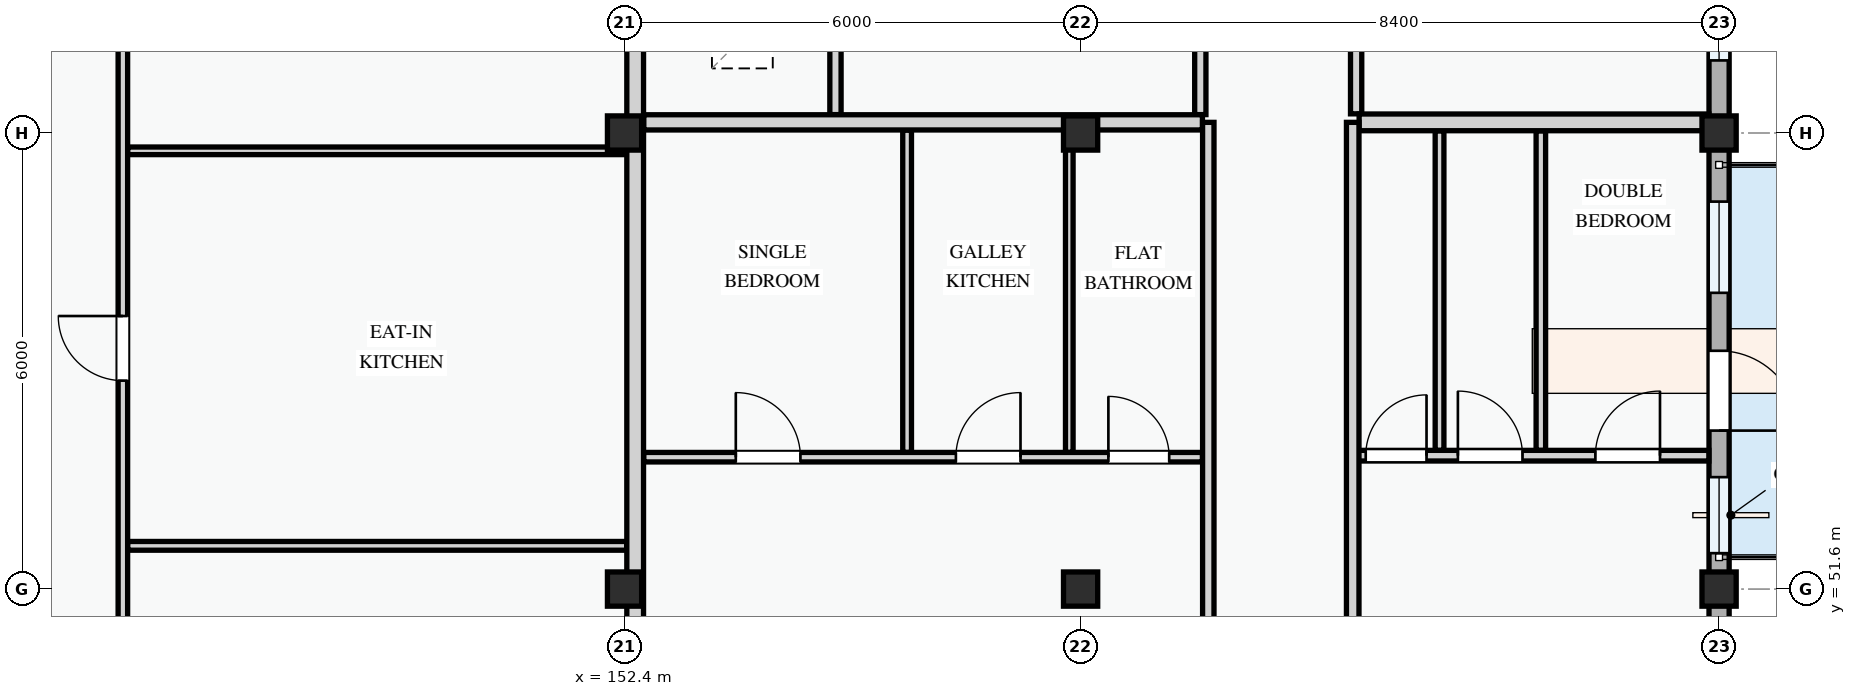
"""IFC4 building model, lengths in metres.
Left out: names, types, materials, properties, quantities, classifications, styles, units other than length and angle.
Written with IfcOpenShell. Run it as: python <this file> out.ifc"""

import sys

from ifc_helpers import new_model, si_unit, direction, frame, frame_2d, origin, origin_2d, place, context, subcontext, project, spatial, rectangle, extrude, element, fill, save


model = new_model("IFC4")
c1 = context("Model", 3, precision=1e-05, world=origin(), true_north=direction((0.0, 1.0)))
c2 = subcontext(c1, "Body", "Model", "MODEL_VIEW")
j1 = project(units=[si_unit("LENGTHUNIT", "METRE"), si_unit("PLANEANGLEUNIT", "RADIAN")], contexts=[c1])
p1 = place(None, origin())
s1 = spatial("IfcSite", under=j1, at=p1, CompositionType="ELEMENT")
p2 = place(p1, origin())
s2 = spatial("IfcBuilding", under=s1, at=p2, CompositionType="ELEMENT")
p3 = place(p2, frame((0.0, 0.0, 24.6)))
s3 = spatial("IfcBuildingStorey", under=s2, at=p3, CompositionType="ELEMENT", Elevation=24.6)
for number, where, z_axis, x_axis in (
    (1, (152.4, 51.6, 0.0), (0.0, 0.0, 1.0), (1.0, 0.0, 0.0)),
    (2, (152.4, 57.6, 0.0), (0.0, 0.0, 1.0), (1.0, 0.0, 0.0)),
    (3, (158.4, 51.6, 0.0), (0.0, 0.0, 1.0), (1.0, 0.0, 0.0)),
    (4, (158.4, 57.6, 0.0), (0.0, 0.0, 1.0), (1.0, 0.0, 0.0)),
    (5, (166.8, 51.6, 0.0), (0.0, 0.0, 1.0), (1.0, 0.0, 0.0)),
    (6, (166.8, 57.6, 0.0), (0.0, 0.0, 1.0), (1.0, 0.0, 0.0)),
):
    element("IfcColumn", number, at=place(p3, frame(where, z_axis=z_axis, x_axis=x_axis)), inside=s3, PredefinedType="COLUMN", context=c2, shape_type="SweptSolid", body=[
        extrude(rectangle(XDim=0.45, YDim=0.45, at=origin_2d()), origin(), (0.0, 0.0, 1.0), 3.3),
    ])
p4 = place(p3, frame((166.8, 43.2, 0.0), z_axis=(0.0, 0.0, 1.0), x_axis=(0.0, 1.0, 0.0)))
e7 = element("IfcWall", 7, at=p4, inside=s3, PredefinedType="STANDARD", context=c2, shape_type="SweptSolid", body=[
    extrude(rectangle(XDim=8.4, YDim=0.265, at=frame_2d((4.2, 0.0))), origin(), (0.0, 0.0, 1.0), 2.425),
])
p5 = place(p4, frame((0.62, 0.0, 0.0)))
e8 = element("IfcOpeningElement", 8, at=p5, cuts=e7, PredefinedType="OPENING", context=c2, shape_type="SweptSolid", body=[
    extrude(rectangle(XDim=1.6, YDim=2.2, at=frame_2d((0.8, 1.1))), frame((0.0, 0.143, 0.0), z_axis=(0.0, -1.0, 0.0), x_axis=(1.0, 0.0, 0.0)), (0.0, 0.0, 1.0), 0.285),
])
p6 = place(p4, frame((3.35, 0.0, 0.78)))
e9 = element("IfcOpeningElement", 9, at=p6, cuts=e7, PredefinedType="OPENING", context=c2, shape_type="SweptSolid", body=[
    extrude(rectangle(XDim=1.1, YDim=1.3, at=frame_2d((0.55, 0.65))), frame((0.0, 0.143, 0.0), z_axis=(0.0, -1.0, 0.0), x_axis=(1.0, 0.0, 0.0)), (0.0, 0.0, 1.0), 0.285),
])
p7 = place(p4, frame((5.97, 0.0, 0.78)))
e10 = element("IfcOpeningElement", 10, at=p7, cuts=e7, PredefinedType="OPENING", context=c2, shape_type="SweptSolid", body=[
    extrude(rectangle(XDim=1.8, YDim=1.5, at=frame_2d((0.9, 0.75))), frame((0.0, 0.143, 0.0), z_axis=(0.0, -1.0, 0.0), x_axis=(1.0, 0.0, 0.0)), (0.0, 0.0, 1.0), 0.285),
])
p8 = place(p3, frame((166.8, 51.6, 0.0), z_axis=(0.0, 0.0, 1.0), x_axis=(0.0, 1.0, 0.0)))
e11 = element("IfcWall", 11, at=p8, inside=s3, PredefinedType="STANDARD", context=c2, shape_type="SweptSolid", body=[
    extrude(rectangle(XDim=6.0, YDim=0.265, at=frame_2d((3.0, 0.0))), origin(), (0.0, 0.0, 1.0), 2.575),
])
p9 = place(p8, frame((2.085, 0.0, 0.0)))
e12 = element("IfcOpeningElement", 12, at=p9, cuts=e11, PredefinedType="OPENING", context=c2, shape_type="SweptSolid", body=[
    extrude(rectangle(XDim=1.05, YDim=2.15, at=frame_2d((0.525, 1.075))), frame((0.0, 0.143, 0.0), z_axis=(0.0, -1.0, 0.0), x_axis=(1.0, 0.0, 0.0)), (0.0, 0.0, 1.0), 0.285),
])
p10 = place(p8, frame((0.472, 0.0, 0.78)))
e13 = element("IfcOpeningElement", 13, at=p10, cuts=e11, PredefinedType="OPENING", context=c2, shape_type="SweptSolid", body=[
    extrude(rectangle(XDim=1.0, YDim=1.25, at=frame_2d((0.5, 0.625))), frame((0.0, 0.143, 0.0), z_axis=(0.0, -1.0, 0.0), x_axis=(1.0, 0.0, 0.0)), (0.0, 0.0, 1.0), 0.285),
])
p11 = place(p8, frame((3.897, 0.0, 0.78)))
e14 = element("IfcOpeningElement", 14, at=p11, cuts=e11, PredefinedType="OPENING", context=c2, shape_type="SweptSolid", body=[
    extrude(rectangle(XDim=1.2, YDim=1.35, at=frame_2d((0.6, 0.675))), frame((0.0, 0.143, 0.0), z_axis=(0.0, -1.0, 0.0), x_axis=(1.0, 0.0, 0.0)), (0.0, 0.0, 1.0), 0.285),
])
p12 = place(p3, frame((166.8, 57.6, 0.0), z_axis=(0.0, 0.0, 1.0), x_axis=(0.0, 1.0, 0.0)))
e15 = element("IfcWall", 15, at=p12, inside=s3, PredefinedType="STANDARD", context=c2, shape_type="SweptSolid", body=[
    extrude(rectangle(XDim=8.4, YDim=0.265, at=frame_2d((4.2, 0.0))), origin(), (0.0, 0.0, 1.0), 2.425),
])
p13 = place(p12, frame((0.955, 0.0, 0.78)))
e16 = element("IfcOpeningElement", 16, at=p13, cuts=e15, PredefinedType="OPENING", context=c2, shape_type="SweptSolid", body=[
    extrude(rectangle(XDim=2.48, YDim=1.46, at=frame_2d((1.24, 0.73))), frame((0.0, 0.143, 0.0), z_axis=(0.0, -1.0, 0.0), x_axis=(1.0, 0.0, 0.0)), (0.0, 0.0, 1.0), 0.285),
])
p14 = place(p12, frame((4.923, 0.0, 0.78)))
e17 = element("IfcOpeningElement", 17, at=p14, cuts=e15, PredefinedType="OPENING", context=c2, shape_type="SweptSolid", body=[
    extrude(rectangle(XDim=1.48, YDim=1.52, at=frame_2d((0.74, 0.76))), frame((0.0, 0.143, 0.0), z_axis=(0.0, -1.0, 0.0), x_axis=(1.0, 0.0, 0.0)), (0.0, 0.0, 1.0), 0.285),
])
for number, where, z_axis, x_axis in (
    (18, (155.175, 61.724, 0.0), (0.0, 0.0, 1.0), (0.0, -1.0, 0.0)),
    (19, (159.975, 61.724, 0.0), (0.0, 0.0, 1.0), (0.0, -1.0, 0.0)),
):
    element("IfcWall", number, at=place(p3, frame(where, z_axis=z_axis, x_axis=x_axis)), inside=s3, PredefinedType="PARTITIONING", context=c2, shape_type="SweptSolid", body=[
        extrude(rectangle(XDim=3.882, YDim=0.148, at=frame_2d((1.941, 0.0))), origin(), (0.0, 0.0, 1.0), 3.0),
    ])
p15 = place(p3, frame((162.025, 61.724, 0.0), z_axis=(0.0, 0.0, 1.0), x_axis=(0.0, -1.0, 0.0)))
e20 = element("IfcWall", 20, at=p15, inside=s3, PredefinedType="PARTITIONING", context=c2, shape_type="SweptSolid", body=[
    extrude(rectangle(XDim=3.872, YDim=0.148, at=frame_2d((1.936, 0.0))), origin(), (0.0, 0.0, 1.0), 3.0),
])
p16 = place(p3, frame((152.652, 53.335, 0.0), z_axis=(0.0, 0.0, 1.0), x_axis=(1.0, 0.0, 0.0)))
e21 = element("IfcWall", 21, at=p16, inside=s3, PredefinedType="PARTITIONING", context=c2, shape_type="SweptSolid", body=[
    extrude(rectangle(XDim=7.351, YDim=0.125, at=frame_2d((3.675, 0.0))), origin(), (0.0, 0.0, 1.0), 3.0),
])
p17 = place(p16, frame((1.212, 0.0, 0.0)))
e22 = element("IfcOpeningElement", 22, at=p17, cuts=e21, PredefinedType="OPENING", context=c2, shape_type="SweptSolid", body=[
    extrude(rectangle(XDim=0.85, YDim=2.1, at=frame_2d((0.425, 1.05))), frame((0.0, 0.073, 0.0), z_axis=(0.0, -1.0, 0.0), x_axis=(1.0, 0.0, 0.0)), (0.0, 0.0, 1.0), 0.145),
])
p18 = place(p16, frame((4.107, 0.0, 0.0)))
e23 = element("IfcOpeningElement", 23, at=p18, cuts=e21, PredefinedType="OPENING", context=c2, shape_type="SweptSolid", body=[
    extrude(rectangle(XDim=0.85, YDim=2.1, at=frame_2d((0.425, 1.05))), frame((0.0, 0.073, 0.0), z_axis=(0.0, -1.0, 0.0), x_axis=(1.0, 0.0, 0.0)), (0.0, 0.0, 1.0), 0.145),
])
p19 = place(p16, frame((6.114, 0.0, 0.0)))
e24 = element("IfcOpeningElement", 24, at=p19, cuts=e21, PredefinedType="OPENING", context=c2, shape_type="SweptSolid", body=[
    extrude(rectangle(XDim=0.8, YDim=2.1, at=frame_2d((0.4, 1.05))), frame((0.0, 0.073, 0.0), z_axis=(0.0, -1.0, 0.0), x_axis=(1.0, 0.0, 0.0)), (0.0, 0.0, 1.0), 0.145),
])
p20 = place(p3, frame((156.118, 53.399, 0.0), z_axis=(0.0, 0.0, 1.0), x_axis=(0.0, 1.0, 0.0)))
e25 = element("IfcWall", 25, at=p20, inside=s3, PredefinedType="PARTITIONING", context=c2, shape_type="SweptSolid", body=[
    extrude(rectangle(XDim=4.239, YDim=0.115, at=frame_2d((2.119, 0.0))), origin(), (0.0, 0.0, 1.0), 3.0),
])
p21 = place(p3, frame((158.251, 53.399, 0.0), z_axis=(0.0, 0.0, 1.0), x_axis=(0.0, 1.0, 0.0)))
e26 = element("IfcWall", 26, at=p21, inside=s3, PredefinedType="PARTITIONING", context=c2, shape_type="SweptSolid", body=[
    extrude(rectangle(XDim=4.239, YDim=0.1, at=frame_2d((2.119, 0.0))), origin(), (0.0, 0.0, 1.0), 2.575),
])
p22 = place(p3, frame((161.98, 53.355, 0.0), z_axis=(0.0, 0.0, 1.0), x_axis=(1.0, 0.0, 0.0)))
e27 = element("IfcWall", 27, at=p22, inside=s3, PredefinedType="PARTITIONING", context=c2, shape_type="SweptSolid", body=[
    extrude(rectangle(XDim=4.686, YDim=0.14, at=frame_2d((2.343, 0.0))), origin(), (0.0, 0.0, 1.0), 3.0),
])
p23 = place(p22, frame((0.171, 0.0, 0.0)))
e28 = element("IfcOpeningElement", 28, at=p23, cuts=e27, PredefinedType="OPENING", context=c2, shape_type="SweptSolid", body=[
    extrude(rectangle(XDim=0.8, YDim=2.1, at=frame_2d((0.4, 1.05))), frame((0.0, 0.08, 0.0), z_axis=(0.0, -1.0, 0.0), x_axis=(1.0, 0.0, 0.0)), (0.0, 0.0, 1.0), 0.16),
])
p24 = place(p22, frame((1.384, 0.0, 0.0)))
e29 = element("IfcOpeningElement", 29, at=p24, cuts=e27, PredefinedType="OPENING", context=c2, shape_type="SweptSolid", body=[
    extrude(rectangle(XDim=0.85, YDim=2.1, at=frame_2d((0.425, 1.05))), frame((0.0, 0.08, 0.0), z_axis=(0.0, -1.0, 0.0), x_axis=(1.0, 0.0, 0.0)), (0.0, 0.0, 1.0), 0.16),
])
p25 = place(p22, frame((3.193, 0.0, 0.0)))
e30 = element("IfcOpeningElement", 30, at=p25, cuts=e27, PredefinedType="OPENING", context=c2, shape_type="SweptSolid", body=[
    extrude(rectangle(XDim=0.85, YDim=2.1, at=frame_2d((0.425, 1.05))), frame((0.0, 0.08, 0.0), z_axis=(0.0, -1.0, 0.0), x_axis=(1.0, 0.0, 0.0)), (0.0, 0.0, 1.0), 0.16),
])
p26 = place(p3, frame((164.455, 53.427, 0.0), z_axis=(0.0, 0.0, 1.0), x_axis=(0.0, 1.0, 0.0)))
e31 = element("IfcWall", 31, at=p26, inside=s3, PredefinedType="PARTITIONING", context=c2, shape_type="SweptSolid", body=[
    extrude(rectangle(XDim=4.201, YDim=0.125, at=frame_2d((2.101, 0.0))), origin(), (0.0, 0.0, 1.0), 3.0),
])
p27 = place(p3, frame((163.122, 53.427, 0.0), z_axis=(0.0, 0.0, 1.0), x_axis=(0.0, 1.0, 0.0)))
e32 = element("IfcWall", 32, at=p27, inside=s3, PredefinedType="PARTITIONING", context=c2, shape_type="SweptSolid", body=[
    extrude(rectangle(XDim=4.201, YDim=0.115, at=frame_2d((2.101, 0.0))), origin(), (0.0, 0.0, 1.0), 3.0),
])
p28 = place(p3, frame((152.652, 57.74, 0.0), z_axis=(0.0, 0.0, 1.0), x_axis=(1.0, 0.0, 0.0)))
e33 = element("IfcWall", 33, at=p28, inside=s3, PredefinedType="PARTITIONING", context=c2, shape_type="SweptSolid", body=[
    extrude(rectangle(XDim=7.351, YDim=0.2, at=frame_2d((3.675, 0.0))), origin(), (0.0, 0.0, 1.0), 2.375),
])
p29 = place(p3, frame((162.064, 57.74, 0.0), z_axis=(0.0, 0.0, 1.0), x_axis=(1.0, 0.0, 0.0)))
e34 = element("IfcWall", 34, at=p29, inside=s3, PredefinedType="PARTITIONING", context=c2, shape_type="SweptSolid", body=[
    extrude(rectangle(XDim=4.601, YDim=0.22, at=frame_2d((2.301, 0.0))), origin(), (0.0, 0.0, 1.0), 2.375),
])
p30 = place(p3, frame((160.08, 37.334, 0.0), z_axis=(0.0, 0.0, 1.0), x_axis=(0.0, 1.0, 0.0)))
e35 = element("IfcWall", 35, at=p30, inside=s3, PredefinedType="PARTITIONING", context=c2, shape_type="SweptSolid", body=[
    extrude(rectangle(XDim=20.406, YDim=0.15, at=frame_2d((10.203, 0.0))), origin(), (0.0, 0.0, 1.0), 3.0),
])
p31 = place(p30, frame((2.349, 0.0, 0.0)))
e36 = element("IfcOpeningElement", 36, at=p31, cuts=e35, PredefinedType="OPENING", context=c2, shape_type="SweptSolid", body=[
    extrude(rectangle(XDim=0.92, YDim=2.1, at=frame_2d((0.46, 1.05))), frame((0.0, 0.085, 0.0), z_axis=(0.0, -1.0, 0.0), x_axis=(1.0, 0.0, 0.0)), (0.0, 0.0, 1.0), 0.17),
])
p32 = place(p30, frame((11.646, 0.0, 0.0)))
e37 = element("IfcOpeningElement", 37, at=p32, cuts=e35, PredefinedType="OPENING", context=c2, shape_type="SweptSolid", body=[
    extrude(rectangle(XDim=0.92, YDim=2.1, at=frame_2d((0.46, 1.05))), frame((0.0, 0.085, 0.0), z_axis=(0.0, -1.0, 0.0), x_axis=(1.0, 0.0, 0.0)), (0.0, 0.0, 1.0), 0.17),
])
p33 = place(p3, frame((161.98, 37.334, 0.0), z_axis=(0.0, 0.0, 1.0), x_axis=(0.0, 1.0, 0.0)))
e38 = element("IfcWall", 38, at=p33, inside=s3, PredefinedType="PARTITIONING", context=c2, shape_type="SweptSolid", body=[
    extrude(rectangle(XDim=20.406, YDim=0.165, at=frame_2d((10.203, 0.0))), origin(), (0.0, 0.0, 1.0), 3.0),
])
p34 = place(p33, frame((2.406, 0.0, 0.0)))
e39 = element("IfcOpeningElement", 39, at=p34, cuts=e38, PredefinedType="OPENING", context=c2, shape_type="SweptSolid", body=[
    extrude(rectangle(XDim=0.92, YDim=2.1, at=frame_2d((0.46, 1.05))), frame((0.0, 0.093, 0.0), z_axis=(0.0, -1.0, 0.0), x_axis=(1.0, 0.0, 0.0)), (0.0, 0.0, 1.0), 0.185),
])
p35 = place(p33, frame((11.646, 0.0, 0.0)))
e40 = element("IfcOpeningElement", 40, at=p35, cuts=e38, PredefinedType="OPENING", context=c2, shape_type="SweptSolid", body=[
    extrude(rectangle(XDim=0.92, YDim=2.1, at=frame_2d((0.46, 1.05))), frame((0.0, 0.093, 0.0), z_axis=(0.0, -1.0, 0.0), x_axis=(1.0, 0.0, 0.0)), (0.0, 0.0, 1.0), 0.185),
])
p36 = place(p3, frame((145.8, 43.334, 0.0), z_axis=(0.0, 0.0, 1.0), x_axis=(0.0, 1.0, 0.0)))
e41 = element("IfcWall", 41, at=p36, inside=s3, PredefinedType="PARTITIONING", context=c2, shape_type="SweptSolid", body=[
    extrude(rectangle(XDim=18.408, YDim=0.125, at=frame_2d((9.204, 0.0))), origin(), (0.0, 0.0, 1.0), 3.0),
])
p37 = place(p36, frame((3.955, 0.0, 0.0)))
e42 = element("IfcOpeningElement", 42, at=p37, cuts=e41, PredefinedType="OPENING", context=c2, shape_type="SweptSolid", body=[
    extrude(rectangle(XDim=0.82, YDim=2.08, at=frame_2d((0.41, 1.04))), frame((0.0, 0.073, 0.0), z_axis=(0.0, -1.0, 0.0), x_axis=(1.0, 0.0, 0.0)), (0.0, 0.0, 1.0), 0.145),
])
p38 = place(p36, frame((11.008, 0.0, 0.0)))
e43 = element("IfcOpeningElement", 43, at=p38, cuts=e41, PredefinedType="OPENING", context=c2, shape_type="SweptSolid", body=[
    extrude(rectangle(XDim=0.85, YDim=2.1, at=frame_2d((0.425, 1.05))), frame((0.0, 0.073, 0.0), z_axis=(0.0, -1.0, 0.0), x_axis=(1.0, 0.0, 0.0)), (0.0, 0.0, 1.0), 0.145),
])
p39 = place(p36, frame((15.858, 0.0, 0.0)))
e44 = element("IfcOpeningElement", 44, at=p39, cuts=e41, PredefinedType="OPENING", context=c2, shape_type="SweptSolid", body=[
    extrude(rectangle(XDim=0.8, YDim=2.1, at=frame_2d((0.4, 1.05))), frame((0.0, 0.073, 0.0), z_axis=(0.0, -1.0, 0.0), x_axis=(1.0, 0.0, 0.0)), (0.0, 0.0, 1.0), 0.145),
])
p40 = place(p3, frame((145.865, 52.169, 0.0), z_axis=(0.0, 0.0, 1.0), x_axis=(1.0, 0.0, 0.0)))
e45 = element("IfcWall", 45, at=p40, inside=s3, PredefinedType="PARTITIONING", context=c2, shape_type="SweptSolid", body=[
    extrude(rectangle(XDim=6.563, YDim=0.115, at=frame_2d((3.282, 0.0))), origin(), (0.0, 0.0, 1.0), 3.0),
])
p41 = place(p3, frame((145.865, 57.365, 0.0), z_axis=(0.0, 0.0, 1.0), x_axis=(1.0, 0.0, 0.0)))
e46 = element("IfcWall", 46, at=p41, inside=s3, PredefinedType="PARTITIONING", context=c2, shape_type="SweptSolid", body=[
    extrude(rectangle(XDim=6.563, YDim=0.1, at=frame_2d((3.282, 0.0))), origin(), (0.0, 0.0, 1.0), 2.375),
])
p42 = place(p3, frame((152.54, 43.26, 0.0), z_axis=(0.0, 0.0, 1.0), x_axis=(0.0, 1.0, 0.0)))
e47 = element("IfcWall", 47, at=p42, inside=s3, PredefinedType="PARTITIONING", context=c2, shape_type="SweptSolid", body=[
    extrude(rectangle(XDim=18.464, YDim=0.22, at=frame_2d((9.232, 0.0))), origin(), (0.0, 0.0, 1.0), 2.425),
])
p43 = place(p9, frame((1.05, 0.0, 0.0), z_axis=(0.0, 0.0, 1.0), x_axis=(-1.0, 0.0, 0.0)))
e48 = element("IfcDoor", 48, at=p43, inside=s3, OperationType="SINGLE_SWING_RIGHT", PredefinedType="DOOR", context=c2, shape_type="SweptSolid", body=[
    extrude(rectangle(XDim=1.05, YDim=2.15, at=frame_2d((0.525, 1.075))), frame((0.0, 0.025, 0.0), z_axis=(0.0, -1.0, 0.0), x_axis=(1.0, 0.0, 0.0)), (0.0, 0.0, 1.0), 0.05),
])
fill(e12, e48)
p44 = place(p10, origin())
e49 = element("IfcWindow", 49, at=p44, inside=s3, PartitioningType="SINGLE_PANEL", PredefinedType="WINDOW", context=c2, shape_type="SweptSolid", body=[
    extrude(rectangle(XDim=1.0, YDim=1.25, at=frame_2d((0.5, 0.625))), frame((0.0, 0.03, 0.0), z_axis=(0.0, -1.0, 0.0), x_axis=(1.0, 0.0, 0.0)), (0.0, 0.0, 1.0), 0.06),
])
fill(e13, e49)
p45 = place(p11, origin())
e50 = element("IfcWindow", 50, at=p45, inside=s3, PartitioningType="SINGLE_PANEL", PredefinedType="WINDOW", context=c2, shape_type="SweptSolid", body=[
    extrude(rectangle(XDim=1.2, YDim=1.35, at=frame_2d((0.6, 0.675))), frame((0.0, 0.03, 0.0), z_axis=(0.0, -1.0, 0.0), x_axis=(1.0, 0.0, 0.0)), (0.0, 0.0, 1.0), 0.06),
])
fill(e14, e50)
p46 = place(p13, origin())
e51 = element("IfcWindow", 51, at=p46, inside=s3, PartitioningType="DOUBLE_PANEL_VERTICAL", PredefinedType="WINDOW", context=c2, shape_type="SweptSolid", body=[
    extrude(rectangle(XDim=2.48, YDim=1.46, at=frame_2d((1.24, 0.73))), frame((0.0, 0.03, 0.0), z_axis=(0.0, -1.0, 0.0), x_axis=(1.0, 0.0, 0.0)), (0.0, 0.0, 1.0), 0.06),
])
fill(e16, e51)
p47 = place(p17, origin())
e52 = element("IfcDoor", 52, at=p47, inside=s3, OperationType="SINGLE_SWING_LEFT", PredefinedType="DOOR", context=c2, shape_type="SweptSolid", body=[
    extrude(rectangle(XDim=0.85, YDim=2.1, at=frame_2d((0.425, 1.05))), frame((0.0, 0.025, 0.0), z_axis=(0.0, -1.0, 0.0), x_axis=(1.0, 0.0, 0.0)), (0.0, 0.0, 1.0), 0.05),
])
fill(e22, e52)
p48 = place(p18, origin())
e53 = element("IfcDoor", 53, at=p48, inside=s3, OperationType="SINGLE_SWING_RIGHT", PredefinedType="DOOR", context=c2, shape_type="SweptSolid", body=[
    extrude(rectangle(XDim=0.85, YDim=2.1, at=frame_2d((0.425, 1.05))), frame((0.0, 0.025, 0.0), z_axis=(0.0, -1.0, 0.0), x_axis=(1.0, 0.0, 0.0)), (0.0, 0.0, 1.0), 0.05),
])
fill(e23, e53)
p49 = place(p19, origin())
e54 = element("IfcDoor", 54, at=p49, inside=s3, OperationType="SINGLE_SWING_LEFT", PredefinedType="DOOR", context=c2, shape_type="SweptSolid", body=[
    extrude(rectangle(XDim=0.8, YDim=2.1, at=frame_2d((0.4, 1.05))), frame((0.0, 0.025, 0.0), z_axis=(0.0, -1.0, 0.0), x_axis=(1.0, 0.0, 0.0)), (0.0, 0.0, 1.0), 0.05),
])
fill(e24, e54)
p50 = place(p23, origin())
e55 = element("IfcDoor", 55, at=p50, inside=s3, OperationType="SINGLE_SWING_RIGHT", PredefinedType="DOOR", context=c2, shape_type="SweptSolid", body=[
    extrude(rectangle(XDim=0.8, YDim=2.1, at=frame_2d((0.4, 1.05))), frame((0.0, 0.025, 0.0), z_axis=(0.0, -1.0, 0.0), x_axis=(1.0, 0.0, 0.0)), (0.0, 0.0, 1.0), 0.05),
])
fill(e28, e55)
p51 = place(p24, origin())
e56 = element("IfcDoor", 56, at=p51, inside=s3, OperationType="SINGLE_SWING_LEFT", PredefinedType="DOOR", context=c2, shape_type="SweptSolid", body=[
    extrude(rectangle(XDim=0.85, YDim=2.1, at=frame_2d((0.425, 1.05))), frame((0.0, 0.025, 0.0), z_axis=(0.0, -1.0, 0.0), x_axis=(1.0, 0.0, 0.0)), (0.0, 0.0, 1.0), 0.05),
])
fill(e29, e56)
p52 = place(p25, origin())
e57 = element("IfcDoor", 57, at=p52, inside=s3, OperationType="SINGLE_SWING_RIGHT", PredefinedType="DOOR", context=c2, shape_type="SweptSolid", body=[
    extrude(rectangle(XDim=0.85, YDim=2.1, at=frame_2d((0.425, 1.05))), frame((0.0, 0.025, 0.0), z_axis=(0.0, -1.0, 0.0), x_axis=(1.0, 0.0, 0.0)), (0.0, 0.0, 1.0), 0.05),
])
fill(e30, e57)
p53 = place(p38, origin())
e58 = element("IfcDoor", 58, at=p53, inside=s3, OperationType="SINGLE_SWING_RIGHT", PredefinedType="DOOR", context=c2, shape_type="SweptSolid", body=[
    extrude(rectangle(XDim=0.85, YDim=2.1, at=frame_2d((0.425, 1.05))), frame((0.0, 0.025, 0.0), z_axis=(0.0, -1.0, 0.0), x_axis=(1.0, 0.0, 0.0)), (0.0, 0.0, 1.0), 0.05),
])
fill(e43, e58)
save(model, sys.argv[1])
